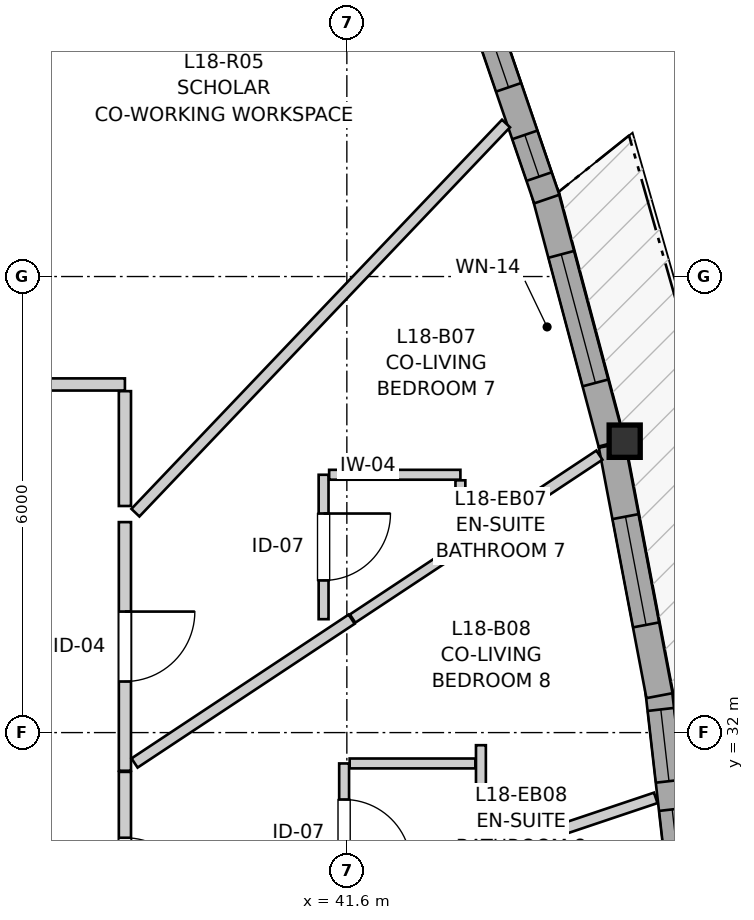
"""IFC4 building model, lengths in metres.
Left out: names, types, materials, properties, quantities, classifications, styles, units other than length and angle.
Written with IfcOpenShell. Run it as: python <this file> out.ifc"""

import sys

from ifc_helpers import new_model, si_unit, direction, frame, frame_2d, origin, origin_2d, place, context, subcontext, project, spatial, rectangle, i_section, extrude, source, transform, mapped, element, fill, save


model = new_model("IFC4")
c1 = context("Model", 3, precision=1e-05, world=origin(), true_north=direction((0.0, 1.0)))
c2 = subcontext(c1, "Body", "Model", "MODEL_VIEW")
j1 = project(units=[si_unit("LENGTHUNIT", "METRE"), si_unit("PLANEANGLEUNIT", "RADIAN")], contexts=[c1])
p1 = place(None, origin())
s1 = spatial("IfcSite", under=j1, at=p1, CompositionType="ELEMENT")
p2 = place(p1, origin())
s2 = spatial("IfcBuilding", under=s1, at=p2, CompositionType="ELEMENT")
p3 = place(p2, frame((0.0, 0.0, 62.2)))
s3 = spatial("IfcBuildingStorey", under=s2, at=p3, CompositionType="ELEMENT", Elevation=62.2)
m1 = source(origin(), c2, "Body", "SweptSolid", [
    extrude(i_section(OverallWidth=0.409, OverallDepth=0.425, WebThickness=0.03, FlangeThickness=0.048, FilletRadius=0.015, at=origin_2d()), origin(), (0.0, 0.0, 1.0), 2.9),
])
p4 = place(p3, frame((45.256, 35.834, 0.0), z_axis=(0.0, 0.0, 1.0), x_axis=(1.0, 0.0, 0.0)))
e1 = element("IfcColumn", 1, at=p4, inside=s3, PredefinedType="PILASTER", context=c2, shape_type="MappedRepresentation", body=[
    mapped(m1, transform((0.0, 0.0, 0.0), x_axis=(1.0, 0.0, 0.0), y_axis=(0.0, 1.0, 0.0), z_axis=(0.0, 0.0, 1.0), scale=1.0)),
])
p5 = place(p3, frame((46.044, 29.556, 0.0), z_axis=(0.0, 0.0, 1.0), x_axis=(-0.113263196818, 0.993565019637, 0.0)))
e2 = element("IfcWall", 2, at=p5, inside=s3, PredefinedType="SOLIDWALL", context=c2, shape_type="SweptSolid", body=[
    extrude(rectangle(XDim=3.037, YDim=0.35, at=frame_2d((1.519, 0.0))), origin(), (0.0, 0.0, 1.0), 2.38),
])
p6 = place(p5, frame((0.492, 0.0, 0.82)))
e3 = element("IfcOpeningElement", 3, at=p6, cuts=e2, PredefinedType="OPENING", context=c2, shape_type="SweptSolid", body=[
    extrude(rectangle(XDim=0.95, YDim=1.35, at=frame_2d((0.475, 0.675))), frame((0.0, 0.185, 0.0), z_axis=(0.0, -1.0, 0.0), x_axis=(1.0, 0.0, 0.0)), (0.0, 0.0, 1.0), 0.37),
])
p7 = place(p5, frame((1.816, 0.0, 0.82)))
e4 = element("IfcOpeningElement", 4, at=p7, cuts=e2, PredefinedType="OPENING", context=c2, shape_type="SweptSolid", body=[
    extrude(rectangle(XDim=0.95, YDim=1.35, at=frame_2d((0.475, 0.675))), frame((0.0, 0.185, 0.0), z_axis=(0.0, -1.0, 0.0), x_axis=(1.0, 0.0, 0.0)), (0.0, 0.0, 1.0), 0.37),
])
p8 = place(p3, frame((45.713, 32.486, 0.0), z_axis=(0.0, 0.0, 1.0), x_axis=(-0.186603748992, 0.982435260392, 0.0)))
e5 = element("IfcWall", 5, at=p8, inside=s3, PredefinedType="SOLIDWALL", context=c2, shape_type="SweptSolid", body=[
    extrude(rectangle(XDim=3.354, YDim=0.35, at=frame_2d((1.677, 0.0))), origin(), (0.0, 0.0, 1.0), 2.38),
])
p9 = place(p8, frame((0.948, 0.0, 0.82)))
e6 = element("IfcOpeningElement", 6, at=p9, cuts=e5, PredefinedType="OPENING", context=c2, shape_type="SweptSolid", body=[
    extrude(rectangle(XDim=1.45, YDim=1.25, at=frame_2d((0.725, 0.625))), frame((0.0, 0.185, 0.0), z_axis=(0.0, -1.0, 0.0), x_axis=(1.0, 0.0, 0.0)), (0.0, 0.0, 1.0), 0.37),
])
p10 = place(p3, frame((45.081, 35.808, 0.0), z_axis=(0.0, 0.0, 1.0), x_axis=(-0.257114470429, 0.966380954436, 0.0)))
e7 = element("IfcWall", 7, at=p10, inside=s3, PredefinedType="SOLIDWALL", context=c2, shape_type="SweptSolid", body=[
    extrude(rectangle(XDim=3.41, YDim=0.35, at=frame_2d((1.705, 0.0))), origin(), (0.0, 0.0, 1.0), 2.38),
])
p11 = place(p10, frame((0.82, 0.0, 0.82)))
e8 = element("IfcOpeningElement", 8, at=p11, cuts=e7, PredefinedType="OPENING", context=c2, shape_type="SweptSolid", body=[
    extrude(rectangle(XDim=1.75, YDim=1.3, at=frame_2d((0.875, 0.65))), frame((0.0, 0.185, 0.0), z_axis=(0.0, -1.0, 0.0), x_axis=(1.0, 0.0, 0.0)), (0.0, 0.0, 1.0), 0.37),
])
p12 = place(p3, frame((44.23, 39.019, 0.0), z_axis=(0.0, 0.0, 1.0), x_axis=(-0.323560153501, 0.94620760252, 0.0)))
e9 = element("IfcWall", 9, at=p12, inside=s3, PredefinedType="SOLIDWALL", context=c2, shape_type="SweptSolid", body=[
    extrude(rectangle(XDim=3.202, YDim=0.35, at=frame_2d((1.601, 0.0))), origin(), (0.0, 0.0, 1.0), 2.38),
])
p13 = place(p12, frame((0.312, 0.0, 0.82)))
e10 = element("IfcOpeningElement", 10, at=p13, cuts=e9, PredefinedType="OPENING", context=c2, shape_type="SweptSolid", body=[
    extrude(rectangle(XDim=0.58, YDim=1.35, at=frame_2d((0.29, 0.675))), frame((0.0, 0.185, 0.0), z_axis=(0.0, -1.0, 0.0), x_axis=(1.0, 0.0, 0.0)), (0.0, 0.0, 1.0), 0.37),
])
p14 = place(p12, frame((1.554, 0.0, 0.82)))
e11 = element("IfcOpeningElement", 11, at=p14, cuts=e9, PredefinedType="OPENING", context=c2, shape_type="SweptSolid", body=[
    extrude(rectangle(XDim=1.15, YDim=1.2, at=frame_2d((0.575, 0.6))), frame((0.0, 0.185, 0.0), z_axis=(0.0, -1.0, 0.0), x_axis=(1.0, 0.0, 0.0)), (0.0, 0.0, 1.0), 0.37),
])
p15 = place(p3, frame((35.011, 36.58, 0.0), z_axis=(0.0, 0.0, 1.0), x_axis=(1.0, 0.0, 0.0)))
e12 = element("IfcWall", 12, at=p15, inside=s3, PredefinedType="PARTITIONING", context=c2, shape_type="SweptSolid", body=[
    extrude(rectangle(XDim=3.669, YDim=0.16, at=frame_2d((1.834, 0.0))), origin(), (0.0, 0.0, 1.0), 2.9),
])
p16 = place(p15, frame((1.363, 0.0, 0.0)))
e13 = element("IfcOpeningElement", 13, at=p16, cuts=e12, PredefinedType="OPENING", context=c2, shape_type="SweptSolid", body=[
    extrude(rectangle(XDim=0.96, YDim=2.1, at=frame_2d((0.48, 1.05))), frame((0.0, 0.09, 0.0), z_axis=(0.0, -1.0, 0.0), x_axis=(1.0, 0.0, 0.0)), (0.0, 0.0, 1.0), 0.18),
])
p17 = place(p3, frame((38.68, 34.769, 0.0), z_axis=(0.0, 0.0, 1.0), x_axis=(0.0, -1.0, 0.0)))
e14 = element("IfcWall", 14, at=p17, inside=s3, PredefinedType="PARTITIONING", context=c2, shape_type="SweptSolid", body=[
    extrude(rectangle(XDim=3.271, YDim=0.16, at=frame_2d((1.635, 0.0))), origin(), (0.0, 0.0, 1.0), 2.9),
])
p18 = place(p17, frame((1.177, 0.0, 0.0)))
e15 = element("IfcOpeningElement", 15, at=p18, cuts=e14, PredefinedType="OPENING", context=c2, shape_type="SweptSolid", body=[
    extrude(rectangle(XDim=0.92, YDim=2.1, at=frame_2d((0.46, 1.05))), frame((0.0, 0.09, 0.0), z_axis=(0.0, -1.0, 0.0), x_axis=(1.0, 0.0, 0.0)), (0.0, 0.0, 1.0), 0.18),
])
p19 = place(p3, frame((38.68, 31.483, 0.0), z_axis=(0.0, 0.0, 1.0), x_axis=(0.0, -1.0, 0.0)))
e16 = element("IfcWall", 16, at=p19, inside=s3, PredefinedType="PARTITIONING", context=c2, shape_type="SweptSolid", body=[
    extrude(rectangle(XDim=2.702, YDim=0.16, at=frame_2d((1.351, 0.0))), origin(), (0.0, 0.0, 1.0), 2.9),
])
p20 = place(p19, frame((0.866, 0.0, 0.0)))
e17 = element("IfcOpeningElement", 17, at=p20, cuts=e16, PredefinedType="OPENING", context=c2, shape_type="SweptSolid", body=[
    extrude(rectangle(XDim=0.92, YDim=2.1, at=frame_2d((0.46, 1.05))), frame((0.0, 0.09, 0.0), z_axis=(0.0, -1.0, 0.0), x_axis=(1.0, 0.0, 0.0)), (0.0, 0.0, 1.0), 0.18),
])
p21 = place(p3, frame((41.294, 35.392, 0.0), z_axis=(0.0, 0.0, 1.0), x_axis=(0.0, -1.0, 0.0)))
e18 = element("IfcWall", 18, at=p21, inside=s3, PredefinedType="PARTITIONING", context=c2, shape_type="SweptSolid", body=[
    extrude(rectangle(XDim=1.9, YDim=0.13, at=frame_2d((0.95, 0.0))), origin(), (0.0, 0.0, 1.0), 2.9),
])
p22 = place(p21, frame((0.51, 0.0, 0.0)))
e19 = element("IfcOpeningElement", 19, at=p22, cuts=e18, PredefinedType="OPENING", context=c2, shape_type="SweptSolid", body=[
    extrude(rectangle(XDim=0.88, YDim=2.05, at=frame_2d((0.44, 1.025))), frame((0.0, 0.075, 0.0), z_axis=(0.0, -1.0, 0.0), x_axis=(1.0, 0.0, 0.0)), (0.0, 0.0, 1.0), 0.15),
])
p23 = place(p3, frame((41.564, 31.594, 0.0), z_axis=(0.0, 0.0, 1.0), x_axis=(0.0, -1.0, 0.0)))
e20 = element("IfcWall", 20, at=p23, inside=s3, PredefinedType="PARTITIONING", context=c2, shape_type="SweptSolid", body=[
    extrude(rectangle(XDim=1.829, YDim=0.13, at=frame_2d((0.915, 0.0))), origin(), (0.0, 0.0, 1.0), 2.9),
])
p24 = place(p23, frame((0.475, 0.0, 0.0)))
e21 = element("IfcOpeningElement", 21, at=p24, cuts=e20, PredefinedType="OPENING", context=c2, shape_type="SweptSolid", body=[
    extrude(rectangle(XDim=0.88, YDim=2.05, at=frame_2d((0.44, 1.025))), frame((0.0, 0.075, 0.0), z_axis=(0.0, -1.0, 0.0), x_axis=(1.0, 0.0, 0.0)), (0.0, 0.0, 1.0), 0.15),
])
p25 = place(p3, frame((35.079, 36.697, 0.0), z_axis=(0.0, 0.0, 1.0), x_axis=(0.404349483928, 0.914604556542, 0.0)))
e22 = element("IfcWall", 22, at=p25, inside=s3, PredefinedType="PARTITIONING", context=c2, shape_type="SweptSolid", body=[
    extrude(rectangle(XDim=11.54, YDim=0.145, at=frame_2d((5.77, 0.0))), origin(), (0.0, 0.0, 1.0), 2.9),
])
p26 = place(p3, frame((38.818, 34.893, 0.0), z_axis=(0.0, 0.0, 1.0), x_axis=(0.68961378572, 0.724177344678, 0.0)))
e23 = element("IfcWall", 23, at=p26, inside=s3, PredefinedType="PARTITIONING", context=c2, shape_type="SweptSolid", body=[
    extrude(rectangle(XDim=7.071, YDim=0.145, at=frame_2d((3.535, 0.0))), origin(), (0.0, 0.0, 1.0), 2.9),
])
p27 = place(p3, frame((38.807, 31.6, 0.0), z_axis=(0.0, 0.0, 1.0), x_axis=(0.833690999351, 0.552231217518, 0.0)))
e24 = element("IfcWall", 24, at=p27, inside=s3, PredefinedType="PARTITIONING", context=c2, shape_type="SweptSolid", body=[
    extrude(rectangle(XDim=3.426, YDim=0.145, at=frame_2d((1.713, 0.0))), origin(), (0.0, 0.0, 1.0), 2.9),
])
p28 = place(p3, frame((43.445, 30.396, 0.0), z_axis=(0.0, 0.0, 1.0), x_axis=(0.947971837268, 0.318354198568, 0.0)))
e25 = element("IfcWall", 25, at=p28, inside=s3, PredefinedType="PARTITIONING", context=c2, shape_type="SweptSolid", body=[
    extrude(rectangle(XDim=2.341, YDim=0.145, at=frame_2d((1.171, 0.0))), origin(), (0.0, 0.0, 1.0), 2.9),
])
p29 = place(p3, frame((43.094, 34.439, 0.0), z_axis=(0.0, 0.0, 1.0), x_axis=(0.833690342454, 0.552232209219, 0.0)))
e26 = element("IfcWall", 26, at=p29, inside=s3, PredefinedType="PARTITIONING", context=c2, shape_type="SweptSolid", body=[
    extrude(rectangle(XDim=2.194, YDim=0.145, at=frame_2d((1.097, 0.0))), origin(), (0.0, 0.0, 1.0), 2.9),
])
p30 = place(p3, frame((41.367, 35.392, 0.0), z_axis=(0.0, 0.0, 1.0), x_axis=(1.0, 0.0, 0.0)))
e27 = element("IfcWall", 27, at=p30, inside=s3, PredefinedType="PARTITIONING", context=c2, shape_type="SweptSolid", body=[
    extrude(rectangle(XDim=1.727, YDim=0.13, at=frame_2d((0.864, 0.0))), origin(), (0.0, 0.0, 1.0), 2.9),
])
p31 = place(p3, frame((41.637, 31.594, 0.0), z_axis=(0.0, 0.0, 1.0), x_axis=(1.0, 0.0, 0.0)))
e28 = element("IfcWall", 28, at=p31, inside=s3, PredefinedType="PARTITIONING", context=c2, shape_type="SweptSolid", body=[
    extrude(rectangle(XDim=1.654, YDim=0.13, at=frame_2d((0.827, 0.0))), origin(), (0.0, 0.0, 1.0), 2.9),
])
p32 = place(p3, frame((38.68, 34.981, 0.0), z_axis=(0.0, 0.0, 1.0), x_axis=(0.0, 1.0, 0.0)))
e29 = element("IfcWall", 29, at=p32, inside=s3, PredefinedType="PARTITIONING", context=c2, shape_type="SweptSolid", body=[
    extrude(rectangle(XDim=1.511, YDim=0.16, at=frame_2d((0.755, 0.0))), origin(), (0.0, 0.0, 1.0), 2.9),
])
p33 = place(p3, frame((41.676, 33.5, 0.0), z_axis=(0.0, 0.0, 1.0), x_axis=(0.833939065936, 0.55185653417, 0.0)))
e30 = element("IfcWall", 30, at=p33, inside=s3, PredefinedType="PARTITIONING", context=c2, shape_type="SweptSolid", body=[
    extrude(rectangle(XDim=1.686, YDim=0.13, at=frame_2d((0.843, 0.0))), origin(), (0.0, 0.0, 1.0), 2.9),
])
p34 = place(p3, frame((43.364, 30.129, 0.0), z_axis=(0.0, 0.0, 1.0), x_axis=(0.0, 1.0, 0.0)))
e31 = element("IfcWall", 31, at=p34, inside=s3, PredefinedType="PARTITIONING", context=c2, shape_type="SweptSolid", body=[
    extrude(rectangle(XDim=1.705, YDim=0.13, at=frame_2d((0.853, 0.0))), origin(), (0.0, 0.0, 1.0), 2.9),
])
p35 = place(p3, frame((43.094, 34.577, 0.0), z_axis=(0.0, 0.0, 1.0), x_axis=(0.0, 1.0, 0.0)))
e32 = element("IfcWall", 32, at=p35, inside=s3, PredefinedType="PARTITIONING", context=c2, shape_type="SweptSolid", body=[
    extrude(rectangle(XDim=0.742, YDim=0.13, at=frame_2d((0.371, 0.0))), origin(), (0.0, 0.0, 1.0), 2.9),
])
m2 = source(origin(), c2, "Body", "SweptSolid", [
    extrude(rectangle(XDim=0.95, YDim=1.35, at=frame_2d((0.475, 0.675))), frame((0.0, 0.03, 0.0), z_axis=(0.0, -1.0, 0.0), x_axis=(1.0, 0.0, 0.0)), (0.0, 0.0, 1.0), 0.06),
])
p36 = place(p6, origin())
e33 = element("IfcWindow", 33, at=p36, inside=s3, PartitioningType="SINGLE_PANEL", PredefinedType="WINDOW", context=c2, shape_type="MappedRepresentation", body=[
    mapped(m2, transform((0.0, 0.0, 0.0), x_axis=(1.0, 0.0, 0.0), y_axis=(0.0, 1.0, 0.0), z_axis=(0.0, 0.0, 1.0), scale=1.0)),
])
fill(e3, e33)
p37 = place(p7, origin())
e34 = element("IfcWindow", 34, at=p37, inside=s3, PartitioningType="SINGLE_PANEL", PredefinedType="WINDOW", context=c2, shape_type="MappedRepresentation", body=[
    mapped(m2, transform((0.0, 0.0, 0.0), x_axis=(1.0, 0.0, 0.0), y_axis=(0.0, 1.0, 0.0), z_axis=(0.0, 0.0, 1.0), scale=1.0)),
])
fill(e4, e34)
m3 = source(origin(), c2, "Body", "SweptSolid", [
    extrude(rectangle(XDim=1.45, YDim=1.25, at=frame_2d((0.725, 0.625))), frame((0.0, 0.03, 0.0), z_axis=(0.0, -1.0, 0.0), x_axis=(1.0, 0.0, 0.0)), (0.0, 0.0, 1.0), 0.06),
])
p38 = place(p9, origin())
e35 = element("IfcWindow", 35, at=p38, inside=s3, PartitioningType="SINGLE_PANEL", PredefinedType="WINDOW", context=c2, shape_type="MappedRepresentation", body=[
    mapped(m3, transform((0.0, 0.0, 0.0), x_axis=(1.0, 0.0, 0.0), y_axis=(0.0, 1.0, 0.0), z_axis=(0.0, 0.0, 1.0), scale=1.0)),
])
fill(e6, e35)
m4 = source(origin(), c2, "Body", "SweptSolid", [
    extrude(rectangle(XDim=1.75, YDim=1.3, at=frame_2d((0.875, 0.65))), frame((0.0, 0.03, 0.0), z_axis=(0.0, -1.0, 0.0), x_axis=(1.0, 0.0, 0.0)), (0.0, 0.0, 1.0), 0.06),
])
p39 = place(p11, origin())
e36 = element("IfcWindow", 36, at=p39, inside=s3, PartitioningType="SINGLE_PANEL", PredefinedType="WINDOW", context=c2, shape_type="MappedRepresentation", body=[
    mapped(m4, transform((0.0, 0.0, 0.0), x_axis=(1.0, 0.0, 0.0), y_axis=(0.0, 1.0, 0.0), z_axis=(0.0, 0.0, 1.0), scale=1.0)),
])
fill(e8, e36)
m5 = source(origin(), c2, "Body", "SweptSolid", [
    extrude(rectangle(XDim=0.58, YDim=1.35, at=frame_2d((0.29, 0.675))), frame((0.0, 0.03, 0.0), z_axis=(0.0, -1.0, 0.0), x_axis=(1.0, 0.0, 0.0)), (0.0, 0.0, 1.0), 0.06),
])
p40 = place(p13, origin())
e37 = element("IfcWindow", 37, at=p40, inside=s3, PartitioningType="SINGLE_PANEL", PredefinedType="WINDOW", context=c2, shape_type="MappedRepresentation", body=[
    mapped(m5, transform((0.0, 0.0, 0.0), x_axis=(1.0, 0.0, 0.0), y_axis=(0.0, 1.0, 0.0), z_axis=(0.0, 0.0, 1.0), scale=1.0)),
])
fill(e10, e37)
m6 = source(origin(), c2, "Body", "SweptSolid", [
    extrude(rectangle(XDim=1.15, YDim=1.2, at=frame_2d((0.575, 0.6))), frame((0.0, 0.03, 0.0), z_axis=(0.0, -1.0, 0.0), x_axis=(1.0, 0.0, 0.0)), (0.0, 0.0, 1.0), 0.06),
])
p41 = place(p14, origin())
e38 = element("IfcWindow", 38, at=p41, inside=s3, PartitioningType="SINGLE_PANEL", PredefinedType="WINDOW", context=c2, shape_type="MappedRepresentation", body=[
    mapped(m6, transform((0.0, 0.0, 0.0), x_axis=(1.0, 0.0, 0.0), y_axis=(0.0, 1.0, 0.0), z_axis=(0.0, 0.0, 1.0), scale=1.0)),
])
fill(e11, e38)
m7 = source(origin(), c2, "Body", "SweptSolid", [
    extrude(rectangle(XDim=0.92, YDim=2.1, at=frame_2d((0.46, 1.05))), frame((0.0, 0.025, 0.0), z_axis=(0.0, -1.0, 0.0), x_axis=(1.0, 0.0, 0.0)), (0.0, 0.0, 1.0), 0.05),
])
p42 = place(p18, origin())
e39 = element("IfcDoor", 39, at=p42, inside=s3, OperationType="SINGLE_SWING_LEFT", PredefinedType="DOOR", context=c2, shape_type="MappedRepresentation", body=[
    mapped(m7, transform((0.0, 0.0, 0.0), x_axis=(1.0, 0.0, 0.0), y_axis=(0.0, 1.0, 0.0), z_axis=(0.0, 0.0, 1.0), scale=1.0)),
])
fill(e15, e39)
p43 = place(p20, origin())
e40 = element("IfcDoor", 40, at=p43, inside=s3, OperationType="SINGLE_SWING_RIGHT", PredefinedType="DOOR", context=c2, shape_type="MappedRepresentation", body=[
    mapped(m7, transform((0.0, 0.0, 0.0), x_axis=(1.0, 0.0, 0.0), y_axis=(0.0, 1.0, 0.0), z_axis=(0.0, 0.0, 1.0), scale=1.0)),
])
fill(e17, e40)
m8 = source(origin(), c2, "Body", "SweptSolid", [
    extrude(rectangle(XDim=0.88, YDim=2.05, at=frame_2d((0.44, 1.025))), frame((0.0, 0.025, 0.0), z_axis=(0.0, -1.0, 0.0), x_axis=(1.0, 0.0, 0.0)), (0.0, 0.0, 1.0), 0.05),
])
p44 = place(p22, origin())
e41 = element("IfcDoor", 41, at=p44, inside=s3, OperationType="SINGLE_SWING_LEFT", PredefinedType="DOOR", context=c2, shape_type="MappedRepresentation", body=[
    mapped(m8, transform((0.0, 0.0, 0.0), x_axis=(1.0, 0.0, 0.0), y_axis=(0.0, 1.0, 0.0), z_axis=(0.0, 0.0, 1.0), scale=1.0)),
])
fill(e19, e41)
p45 = place(p24, origin())
e42 = element("IfcDoor", 42, at=p45, inside=s3, OperationType="SINGLE_SWING_RIGHT", PredefinedType="DOOR", context=c2, shape_type="MappedRepresentation", body=[
    mapped(m8, transform((0.0, 0.0, 0.0), x_axis=(1.0, 0.0, 0.0), y_axis=(0.0, 1.0, 0.0), z_axis=(0.0, 0.0, 1.0), scale=1.0)),
])
fill(e21, e42)
save(model, sys.argv[1])
